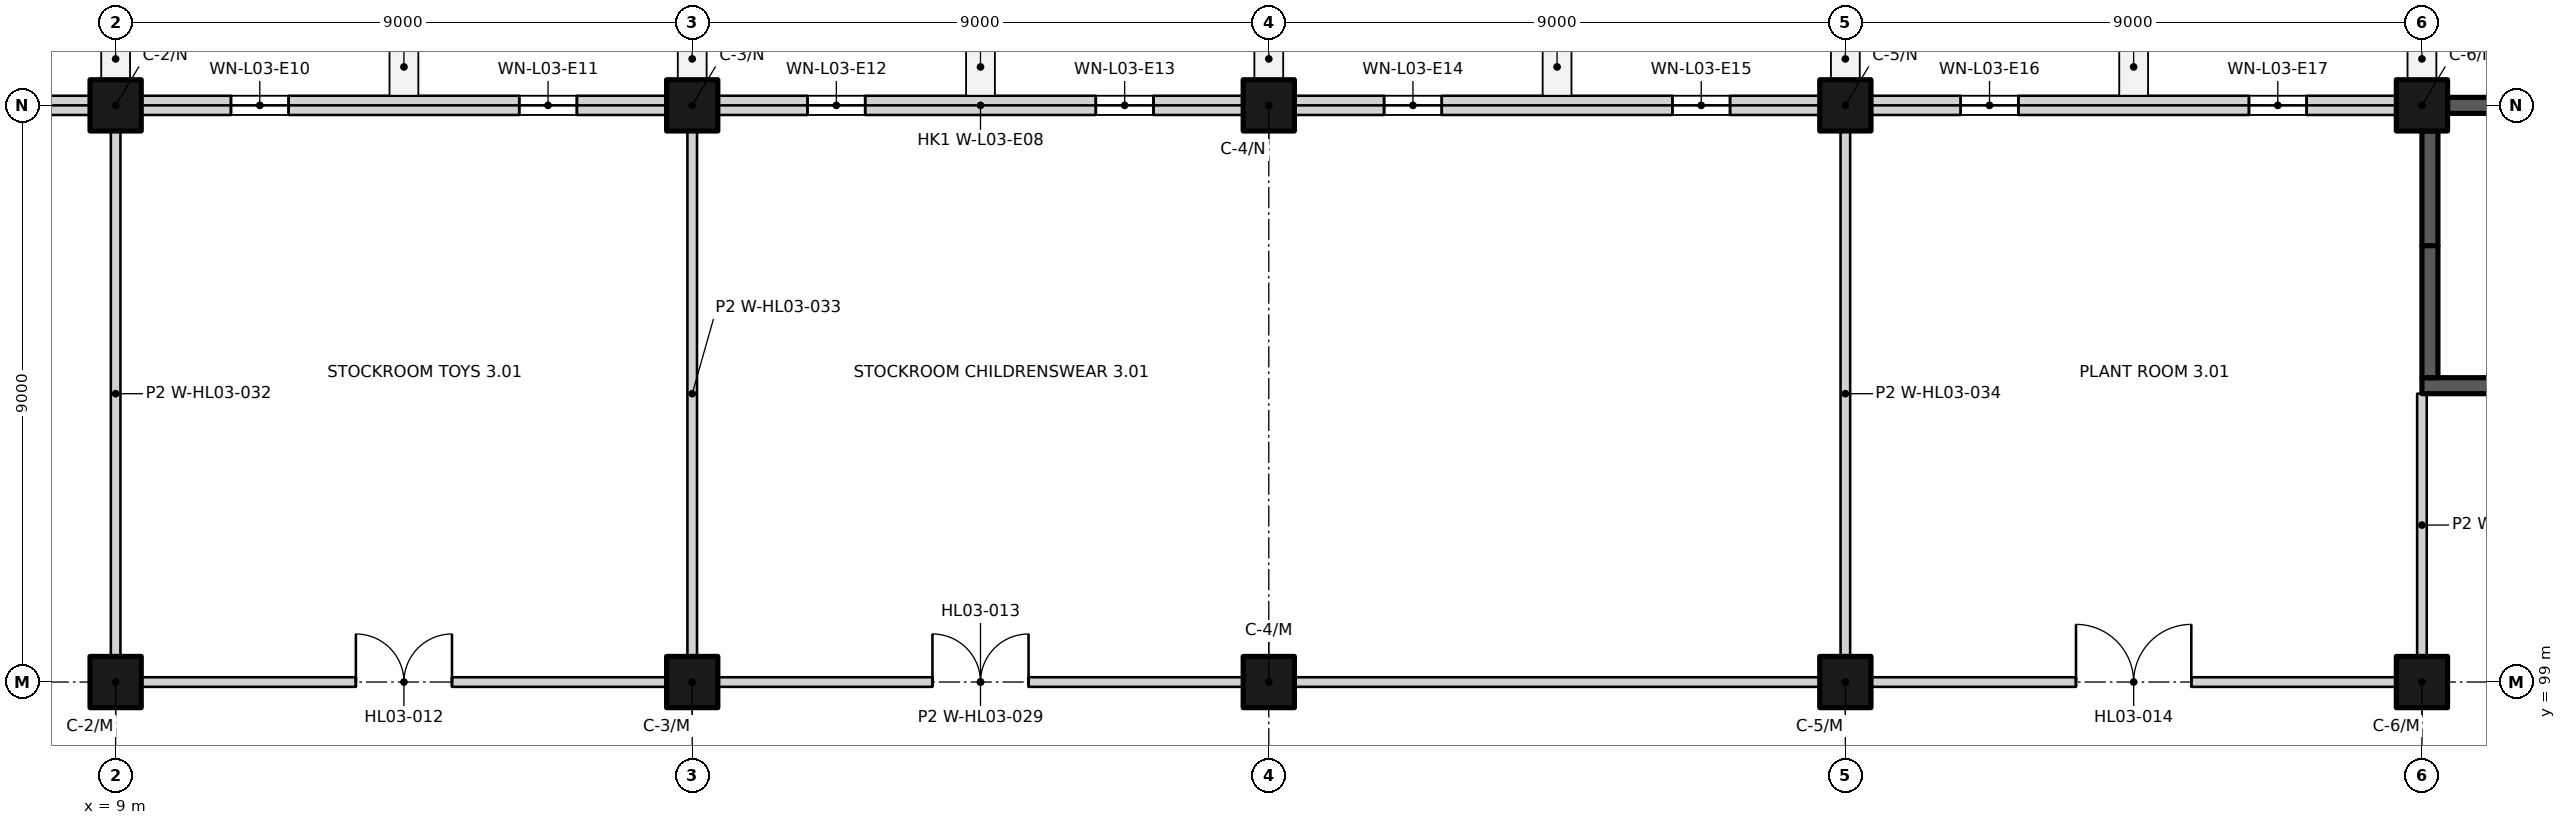
"""IFC4 building model, lengths in metres.
Left out: names, types, materials, properties, quantities, classifications, styles, units other than length and angle.
Written with IfcOpenShell. Run it as: python <this file> out.ifc"""

import sys

from ifc_helpers import new_model, si_unit, direction, frame, frame_2d, origin, origin_2d, place, context, subcontext, project, spatial, rectangle, extrude, element, fill, save


model = new_model("IFC4")
c1 = context("Model", 3, precision=1e-05, world=origin(), true_north=direction((0.0, 1.0)))
c2 = subcontext(c1, "Body", "Model", "MODEL_VIEW")
j1 = project(units=[si_unit("LENGTHUNIT", "METRE"), si_unit("PLANEANGLEUNIT", "RADIAN")], contexts=[c1])
p1 = place(None, origin())
s1 = spatial("IfcSite", under=j1, at=p1, CompositionType="ELEMENT")
p2 = place(p1, origin())
s2 = spatial("IfcBuilding", under=s1, at=p2, CompositionType="ELEMENT")
p3 = place(p2, frame((0.0, 0.0, 15.0)))
s3 = spatial("IfcBuildingStorey", under=s2, at=p3, CompositionType="ELEMENT", Elevation=15.0)
for number, where, z_axis, x_axis in (
    (1, (9.0, 99.0, 0.0), (0.0, 0.0, 1.0), (1.0, 0.0, 0.0)),
    (2, (18.0, 99.0, 0.0), (0.0, 0.0, 1.0), (1.0, 0.0, 0.0)),
    (3, (27.0, 99.0, 0.0), (0.0, 0.0, 1.0), (1.0, 0.0, 0.0)),
    (4, (36.0, 99.0, 0.0), (0.0, 0.0, 1.0), (1.0, 0.0, 0.0)),
    (5, (45.0, 99.0, 0.0), (0.0, 0.0, 1.0), (1.0, 0.0, 0.0)),
    (6, (9.0, 108.0, 0.0), (0.0, 0.0, 1.0), (1.0, 0.0, 0.0)),
    (7, (18.0, 108.0, 0.0), (0.0, 0.0, 1.0), (1.0, 0.0, 0.0)),
    (8, (27.0, 108.0, 0.0), (0.0, 0.0, 1.0), (1.0, 0.0, 0.0)),
    (9, (36.0, 108.0, 0.0), (0.0, 0.0, 1.0), (1.0, 0.0, 0.0)),
    (10, (45.0, 108.0, 0.0), (0.0, 0.0, 1.0), (1.0, 0.0, 0.0)),
):
    element("IfcColumn", number, at=place(p3, frame(where, z_axis=z_axis, x_axis=x_axis)), inside=s3, PredefinedType="COLUMN", context=c2, shape_type="SweptSolid", body=[
        extrude(rectangle(XDim=0.8, YDim=0.8, at=origin_2d()), origin(), (0.0, 0.0, 1.0), 4.5),
    ])
p4 = place(p3, frame((45.0, 103.625, 0.0), z_axis=(0.0, 0.0, 1.0), x_axis=(1.0, 0.0, 0.0)))
e11 = element("IfcWall", 11, at=p4, inside=s3, PredefinedType="SHEAR", context=c2, shape_type="SweptSolid", body=[
    extrude(rectangle(XDim=9.0, YDim=0.25, at=frame_2d((4.5, 0.0))), origin(), (0.0, 0.0, 1.0), 4.5),
])
p5 = place(p3, frame((45.4, 108.0, 0.0), z_axis=(0.0, 0.0, 1.0), x_axis=(1.0, 0.0, 0.0)))
e12 = element("IfcWall", 12, at=p5, inside=s3, PredefinedType="SHEAR", context=c2, shape_type="SweptSolid", body=[
    extrude(rectangle(XDim=8.2, YDim=0.25, at=frame_2d((4.1, 0.0))), origin(), (0.0, 0.0, 1.0), 4.5),
])
p6 = place(p3, frame((45.125, 103.75, 0.0), z_axis=(0.0, 0.0, 1.0), x_axis=(0.0, 1.0, 0.0)))
e13 = element("IfcWall", 13, at=p6, inside=s3, PredefinedType="SHEAR", context=c2, shape_type="SweptSolid", body=[
    extrude(rectangle(XDim=2.062, YDim=0.25, at=frame_2d((1.031, 0.0))), origin(), (0.0, 0.0, 1.0), 4.5),
])
p7 = place(p3, frame((45.125, 105.812, 0.0), z_axis=(0.0, 0.0, 1.0), x_axis=(0.0, 1.0, 0.0)))
e14 = element("IfcWall", 14, at=p7, inside=s3, PredefinedType="SHEAR", context=c2, shape_type="SweptSolid", body=[
    extrude(rectangle(XDim=1.788, YDim=0.25, at=frame_2d((0.894, 0.0))), origin(), (0.0, 0.0, 1.0), 4.5),
])
p8 = place(p3, frame((4.5, 108.0, 0.0), z_axis=(0.0, 0.0, 1.0), x_axis=(1.0, 0.0, 0.0)))
e15 = element("IfcWall", 15, at=p8, inside=s3, PredefinedType="SOLIDWALL", context=c2, shape_type="SweptSolid", body=[
    extrude(rectangle(XDim=4.1, YDim=0.3, at=frame_2d((2.05, 0.0))), origin(), (0.0, 0.0, 1.0), 3.7),
])
p9 = place(p8, frame((1.8, 0.0, 0.45)))
e16 = element("IfcOpeningElement", 16, at=p9, cuts=e15, PredefinedType="OPENING", context=c2, shape_type="SweptSolid", body=[
    extrude(rectangle(XDim=0.9, YDim=3.0, at=frame_2d((0.45, 1.5))), frame((0.0, 0.16, 0.0), z_axis=(0.0, -1.0, 0.0), x_axis=(1.0, 0.0, 0.0)), (0.0, 0.0, 1.0), 0.32),
])
p10 = place(p3, frame((9.4, 108.0, 0.0), z_axis=(0.0, 0.0, 1.0), x_axis=(1.0, 0.0, 0.0)))
e17 = element("IfcWall", 17, at=p10, inside=s3, PredefinedType="SOLIDWALL", context=c2, shape_type="SweptSolid", body=[
    extrude(rectangle(XDim=8.2, YDim=0.3, at=frame_2d((4.1, 0.0))), origin(), (0.0, 0.0, 1.0), 3.7),
])
p11 = place(p10, frame((1.4, 0.0, 0.45)))
e18 = element("IfcOpeningElement", 18, at=p11, cuts=e17, PredefinedType="OPENING", context=c2, shape_type="SweptSolid", body=[
    extrude(rectangle(XDim=0.9, YDim=3.0, at=frame_2d((0.45, 1.5))), frame((0.0, 0.16, 0.0), z_axis=(0.0, -1.0, 0.0), x_axis=(1.0, 0.0, 0.0)), (0.0, 0.0, 1.0), 0.32),
])
p12 = place(p10, frame((5.9, 0.0, 0.45)))
e19 = element("IfcOpeningElement", 19, at=p12, cuts=e17, PredefinedType="OPENING", context=c2, shape_type="SweptSolid", body=[
    extrude(rectangle(XDim=0.9, YDim=3.0, at=frame_2d((0.45, 1.5))), frame((0.0, 0.16, 0.0), z_axis=(0.0, -1.0, 0.0), x_axis=(1.0, 0.0, 0.0)), (0.0, 0.0, 1.0), 0.32),
])
p13 = place(p3, frame((18.4, 108.0, 0.0), z_axis=(0.0, 0.0, 1.0), x_axis=(1.0, 0.0, 0.0)))
e20 = element("IfcWall", 20, at=p13, inside=s3, PredefinedType="SOLIDWALL", context=c2, shape_type="SweptSolid", body=[
    extrude(rectangle(XDim=8.2, YDim=0.3, at=frame_2d((4.1, 0.0))), origin(), (0.0, 0.0, 1.0), 3.7),
])
p14 = place(p13, frame((1.4, 0.0, 0.45)))
e21 = element("IfcOpeningElement", 21, at=p14, cuts=e20, PredefinedType="OPENING", context=c2, shape_type="SweptSolid", body=[
    extrude(rectangle(XDim=0.9, YDim=3.0, at=frame_2d((0.45, 1.5))), frame((0.0, 0.16, 0.0), z_axis=(0.0, -1.0, 0.0), x_axis=(1.0, 0.0, 0.0)), (0.0, 0.0, 1.0), 0.32),
])
p15 = place(p13, frame((5.9, 0.0, 0.45)))
e22 = element("IfcOpeningElement", 22, at=p15, cuts=e20, PredefinedType="OPENING", context=c2, shape_type="SweptSolid", body=[
    extrude(rectangle(XDim=0.9, YDim=3.0, at=frame_2d((0.45, 1.5))), frame((0.0, 0.16, 0.0), z_axis=(0.0, -1.0, 0.0), x_axis=(1.0, 0.0, 0.0)), (0.0, 0.0, 1.0), 0.32),
])
p16 = place(p3, frame((27.4, 108.0, 0.0), z_axis=(0.0, 0.0, 1.0), x_axis=(1.0, 0.0, 0.0)))
e23 = element("IfcWall", 23, at=p16, inside=s3, PredefinedType="SOLIDWALL", context=c2, shape_type="SweptSolid", body=[
    extrude(rectangle(XDim=8.2, YDim=0.3, at=frame_2d((4.1, 0.0))), origin(), (0.0, 0.0, 1.0), 3.7),
])
p17 = place(p16, frame((1.4, 0.0, 0.45)))
e24 = element("IfcOpeningElement", 24, at=p17, cuts=e23, PredefinedType="OPENING", context=c2, shape_type="SweptSolid", body=[
    extrude(rectangle(XDim=0.9, YDim=3.0, at=frame_2d((0.45, 1.5))), frame((0.0, 0.16, 0.0), z_axis=(0.0, -1.0, 0.0), x_axis=(1.0, 0.0, 0.0)), (0.0, 0.0, 1.0), 0.32),
])
p18 = place(p16, frame((5.9, 0.0, 0.45)))
e25 = element("IfcOpeningElement", 25, at=p18, cuts=e23, PredefinedType="OPENING", context=c2, shape_type="SweptSolid", body=[
    extrude(rectangle(XDim=0.9, YDim=3.0, at=frame_2d((0.45, 1.5))), frame((0.0, 0.16, 0.0), z_axis=(0.0, -1.0, 0.0), x_axis=(1.0, 0.0, 0.0)), (0.0, 0.0, 1.0), 0.32),
])
p19 = place(p3, frame((36.4, 108.0, 0.0), z_axis=(0.0, 0.0, 1.0), x_axis=(1.0, 0.0, 0.0)))
e26 = element("IfcWall", 26, at=p19, inside=s3, PredefinedType="SOLIDWALL", context=c2, shape_type="SweptSolid", body=[
    extrude(rectangle(XDim=8.2, YDim=0.3, at=frame_2d((4.1, 0.0))), origin(), (0.0, 0.0, 1.0), 3.7),
])
p20 = place(p19, frame((1.4, 0.0, 0.45)))
e27 = element("IfcOpeningElement", 27, at=p20, cuts=e26, PredefinedType="OPENING", context=c2, shape_type="SweptSolid", body=[
    extrude(rectangle(XDim=0.9, YDim=3.0, at=frame_2d((0.45, 1.5))), frame((0.0, 0.16, 0.0), z_axis=(0.0, -1.0, 0.0), x_axis=(1.0, 0.0, 0.0)), (0.0, 0.0, 1.0), 0.32),
])
p21 = place(p19, frame((5.9, 0.0, 0.45)))
e28 = element("IfcOpeningElement", 28, at=p21, cuts=e26, PredefinedType="OPENING", context=c2, shape_type="SweptSolid", body=[
    extrude(rectangle(XDim=0.9, YDim=3.0, at=frame_2d((0.45, 1.5))), frame((0.0, 0.16, 0.0), z_axis=(0.0, -1.0, 0.0), x_axis=(1.0, 0.0, 0.0)), (0.0, 0.0, 1.0), 0.32),
])
p22 = place(p3, frame((9.4, 99.0, 0.0), z_axis=(0.0, 0.0, 1.0), x_axis=(1.0, 0.0, 0.0)))
e29 = element("IfcWall", 29, at=p22, inside=s3, PredefinedType="PARTITIONING", context=c2, shape_type="SweptSolid", body=[
    extrude(rectangle(XDim=8.2, YDim=0.15, at=frame_2d((4.1, 0.0))), origin(), (0.0, 0.0, 1.0), 4.2),
])
p23 = place(p22, frame((3.35, 0.0, 0.0)))
e30 = element("IfcOpeningElement", 30, at=p23, cuts=e29, PredefinedType="OPENING", context=c2, shape_type="SweptSolid", body=[
    extrude(rectangle(XDim=1.5, YDim=2.1, at=frame_2d((0.75, 1.05))), frame((0.0, 0.085, 0.0), z_axis=(0.0, -1.0, 0.0), x_axis=(1.0, 0.0, 0.0)), (0.0, 0.0, 1.0), 0.17),
])
p24 = place(p3, frame((18.4, 99.0, 0.0), z_axis=(0.0, 0.0, 1.0), x_axis=(1.0, 0.0, 0.0)))
e31 = element("IfcWall", 31, at=p24, inside=s3, PredefinedType="PARTITIONING", context=c2, shape_type="SweptSolid", body=[
    extrude(rectangle(XDim=8.2, YDim=0.15, at=frame_2d((4.1, 0.0))), origin(), (0.0, 0.0, 1.0), 4.2),
])
p25 = place(p24, frame((3.35, 0.0, 0.0)))
e32 = element("IfcOpeningElement", 32, at=p25, cuts=e31, PredefinedType="OPENING", context=c2, shape_type="SweptSolid", body=[
    extrude(rectangle(XDim=1.5, YDim=2.1, at=frame_2d((0.75, 1.05))), frame((0.0, 0.085, 0.0), z_axis=(0.0, -1.0, 0.0), x_axis=(1.0, 0.0, 0.0)), (0.0, 0.0, 1.0), 0.17),
])
p26 = place(p3, frame((27.4, 99.0, 0.0), z_axis=(0.0, 0.0, 1.0), x_axis=(1.0, 0.0, 0.0)))
e33 = element("IfcWall", 33, at=p26, inside=s3, PredefinedType="PARTITIONING", context=c2, shape_type="SweptSolid", body=[
    extrude(rectangle(XDim=8.2, YDim=0.15, at=frame_2d((4.1, 0.0))), origin(), (0.0, 0.0, 1.0), 4.2),
])
p27 = place(p3, frame((36.4, 99.0, 0.0), z_axis=(0.0, 0.0, 1.0), x_axis=(1.0, 0.0, 0.0)))
e34 = element("IfcWall", 34, at=p27, inside=s3, PredefinedType="PARTITIONING", context=c2, shape_type="SweptSolid", body=[
    extrude(rectangle(XDim=8.2, YDim=0.15, at=frame_2d((4.1, 0.0))), origin(), (0.0, 0.0, 1.0), 4.2),
])
p28 = place(p27, frame((3.2, 0.0, 0.0)))
e35 = element("IfcOpeningElement", 35, at=p28, cuts=e34, PredefinedType="OPENING", context=c2, shape_type="SweptSolid", body=[
    extrude(rectangle(XDim=1.8, YDim=2.4, at=frame_2d((0.9, 1.2))), frame((0.0, 0.085, 0.0), z_axis=(0.0, -1.0, 0.0), x_axis=(1.0, 0.0, 0.0)), (0.0, 0.0, 1.0), 0.17),
])
for number, where, z_axis, x_axis in (
    (36, (9.0, 99.4, 0.0), (0.0, 0.0, 1.0), (0.0, 1.0, 0.0)),
    (37, (18.0, 99.4, 0.0), (0.0, 0.0, 1.0), (0.0, 1.0, 0.0)),
    (38, (36.0, 99.4, 0.0), (0.0, 0.0, 1.0), (0.0, 1.0, 0.0)),
):
    element("IfcWall", number, at=place(p3, frame(where, z_axis=z_axis, x_axis=x_axis)), inside=s3, PredefinedType="PARTITIONING", context=c2, shape_type="SweptSolid", body=[
        extrude(rectangle(XDim=8.2, YDim=0.15, at=frame_2d((4.1, 0.0))), origin(), (0.0, 0.0, 1.0), 4.2),
    ])
p29 = place(p3, frame((45.0, 99.4, 0.0), z_axis=(0.0, 0.0, 1.0), x_axis=(0.0, 1.0, 0.0)))
e39 = element("IfcWall", 39, at=p29, inside=s3, PredefinedType="PARTITIONING", context=c2, shape_type="SweptSolid", body=[
    extrude(rectangle(XDim=4.1, YDim=0.15, at=frame_2d((2.05, 0.0))), origin(), (0.0, 0.0, 1.0), 4.2),
])
p30 = place(p11, origin())
e40 = element("IfcWindow", 40, at=p30, inside=s3, PartitioningType="SINGLE_PANEL", PredefinedType="WINDOW", context=c2, shape_type="SweptSolid", body=[
    extrude(rectangle(XDim=0.9, YDim=3.0, at=frame_2d((0.45, 1.5))), frame((0.0, -0.03, 0.0), z_axis=(0.0, -1.0, 0.0), x_axis=(1.0, 0.0, 0.0)), (0.0, 0.0, 1.0), 0.06),
])
fill(e18, e40)
p31 = place(p12, origin())
e41 = element("IfcWindow", 41, at=p31, inside=s3, PartitioningType="SINGLE_PANEL", PredefinedType="WINDOW", context=c2, shape_type="SweptSolid", body=[
    extrude(rectangle(XDim=0.9, YDim=3.0, at=frame_2d((0.45, 1.5))), frame((0.0, -0.03, 0.0), z_axis=(0.0, -1.0, 0.0), x_axis=(1.0, 0.0, 0.0)), (0.0, 0.0, 1.0), 0.06),
])
fill(e19, e41)
p32 = place(p14, origin())
e42 = element("IfcWindow", 42, at=p32, inside=s3, PartitioningType="SINGLE_PANEL", PredefinedType="WINDOW", context=c2, shape_type="SweptSolid", body=[
    extrude(rectangle(XDim=0.9, YDim=3.0, at=frame_2d((0.45, 1.5))), frame((0.0, -0.03, 0.0), z_axis=(0.0, -1.0, 0.0), x_axis=(1.0, 0.0, 0.0)), (0.0, 0.0, 1.0), 0.06),
])
fill(e21, e42)
p33 = place(p15, origin())
e43 = element("IfcWindow", 43, at=p33, inside=s3, PartitioningType="SINGLE_PANEL", PredefinedType="WINDOW", context=c2, shape_type="SweptSolid", body=[
    extrude(rectangle(XDim=0.9, YDim=3.0, at=frame_2d((0.45, 1.5))), frame((0.0, -0.03, 0.0), z_axis=(0.0, -1.0, 0.0), x_axis=(1.0, 0.0, 0.0)), (0.0, 0.0, 1.0), 0.06),
])
fill(e22, e43)
p34 = place(p17, origin())
e44 = element("IfcWindow", 44, at=p34, inside=s3, PartitioningType="SINGLE_PANEL", PredefinedType="WINDOW", context=c2, shape_type="SweptSolid", body=[
    extrude(rectangle(XDim=0.9, YDim=3.0, at=frame_2d((0.45, 1.5))), frame((0.0, -0.03, 0.0), z_axis=(0.0, -1.0, 0.0), x_axis=(1.0, 0.0, 0.0)), (0.0, 0.0, 1.0), 0.06),
])
fill(e24, e44)
p35 = place(p18, origin())
e45 = element("IfcWindow", 45, at=p35, inside=s3, PartitioningType="SINGLE_PANEL", PredefinedType="WINDOW", context=c2, shape_type="SweptSolid", body=[
    extrude(rectangle(XDim=0.9, YDim=3.0, at=frame_2d((0.45, 1.5))), frame((0.0, -0.03, 0.0), z_axis=(0.0, -1.0, 0.0), x_axis=(1.0, 0.0, 0.0)), (0.0, 0.0, 1.0), 0.06),
])
fill(e25, e45)
p36 = place(p20, origin())
e46 = element("IfcWindow", 46, at=p36, inside=s3, PartitioningType="SINGLE_PANEL", PredefinedType="WINDOW", context=c2, shape_type="SweptSolid", body=[
    extrude(rectangle(XDim=0.9, YDim=3.0, at=frame_2d((0.45, 1.5))), frame((0.0, -0.03, 0.0), z_axis=(0.0, -1.0, 0.0), x_axis=(1.0, 0.0, 0.0)), (0.0, 0.0, 1.0), 0.06),
])
fill(e27, e46)
p37 = place(p21, origin())
e47 = element("IfcWindow", 47, at=p37, inside=s3, PartitioningType="SINGLE_PANEL", PredefinedType="WINDOW", context=c2, shape_type="SweptSolid", body=[
    extrude(rectangle(XDim=0.9, YDim=3.0, at=frame_2d((0.45, 1.5))), frame((0.0, -0.03, 0.0), z_axis=(0.0, -1.0, 0.0), x_axis=(1.0, 0.0, 0.0)), (0.0, 0.0, 1.0), 0.06),
])
fill(e28, e47)
p38 = place(p23, origin())
e48 = element("IfcDoor", 48, at=p38, inside=s3, OperationType="DOUBLE_DOOR_SINGLE_SWING", PredefinedType="DOOR", context=c2, shape_type="SweptSolid", body=[
    extrude(rectangle(XDim=1.5, YDim=2.1, at=frame_2d((0.75, 1.05))), frame((0.0, 0.025, 0.0), z_axis=(0.0, -1.0, 0.0), x_axis=(1.0, 0.0, 0.0)), (0.0, 0.0, 1.0), 0.05),
])
fill(e30, e48)
p39 = place(p25, origin())
e49 = element("IfcDoor", 49, at=p39, inside=s3, OperationType="DOUBLE_DOOR_SINGLE_SWING", PredefinedType="DOOR", context=c2, shape_type="SweptSolid", body=[
    extrude(rectangle(XDim=1.5, YDim=2.1, at=frame_2d((0.75, 1.05))), frame((0.0, 0.025, 0.0), z_axis=(0.0, -1.0, 0.0), x_axis=(1.0, 0.0, 0.0)), (0.0, 0.0, 1.0), 0.05),
])
fill(e32, e49)
p40 = place(p28, origin())
e50 = element("IfcDoor", 50, at=p40, inside=s3, OperationType="DOUBLE_DOOR_SINGLE_SWING", PredefinedType="DOOR", context=c2, shape_type="SweptSolid", body=[
    extrude(rectangle(XDim=1.8, YDim=2.4, at=frame_2d((0.9, 1.2))), frame((0.0, 0.025, 0.0), z_axis=(0.0, -1.0, 0.0), x_axis=(1.0, 0.0, 0.0)), (0.0, 0.0, 1.0), 0.05),
])
fill(e35, e50)
save(model, sys.argv[1])
